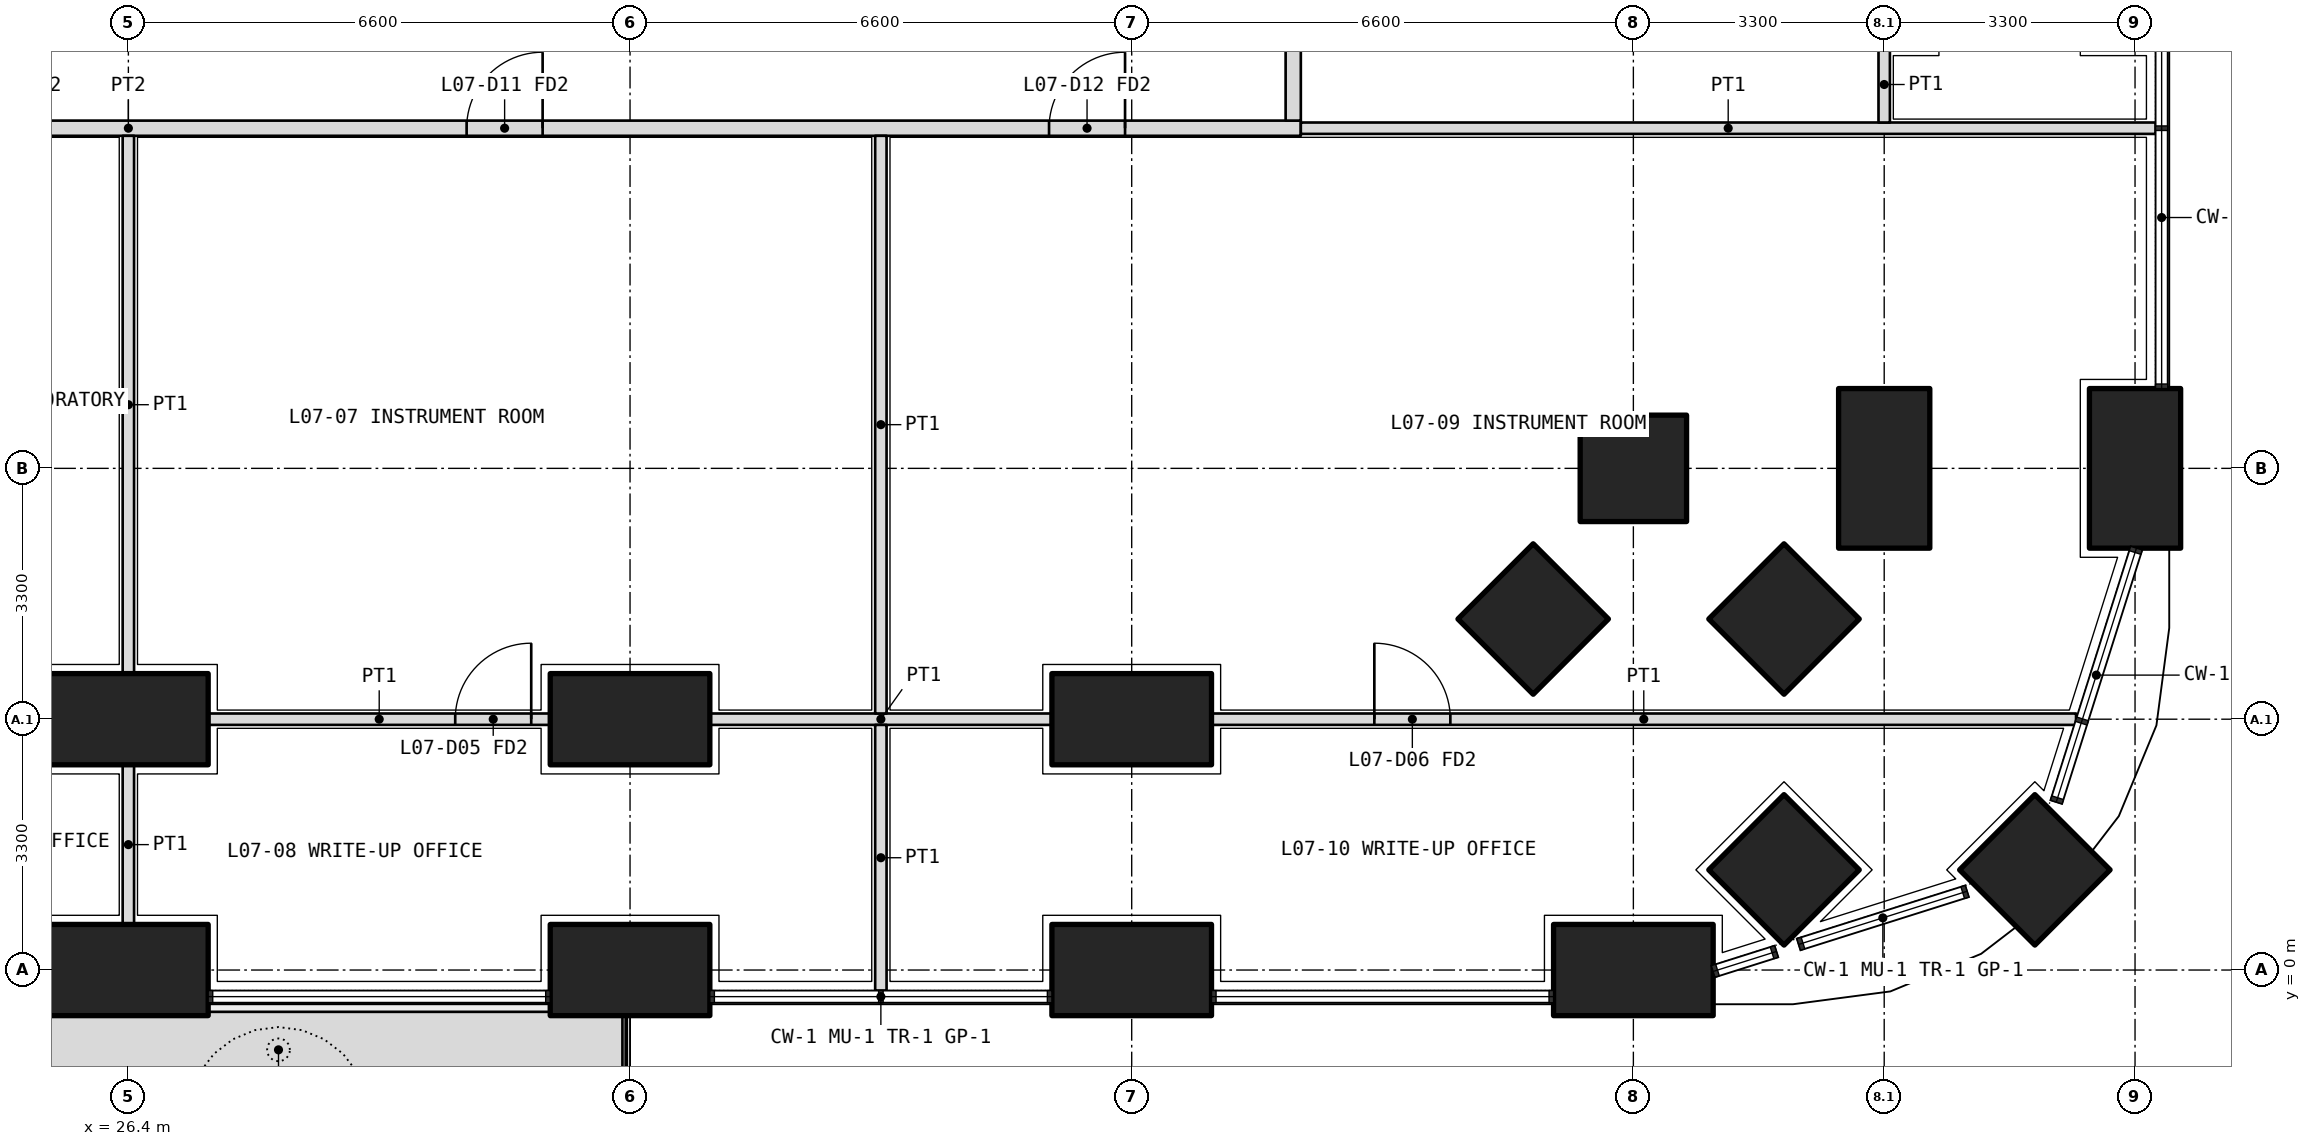
"""IFC4 building model, lengths in metres.
Left out: names, types, materials, properties, quantities, classifications, styles, units other than length and angle.
Written with IfcOpenShell. Run it as: python <this file> out.ifc"""

import sys

from ifc_helpers import new_model, si_unit, direction, frame, frame_2d, origin, origin_2d, place, context, subcontext, project, spatial, polyline, rectangle, outline, extrude, element, fill, save


model = new_model("IFC4")
c1 = context("Model", 3, precision=1e-05, world=origin(), true_north=direction((0.0, 1.0)))
c2 = subcontext(c1, "Body", "Model", "MODEL_VIEW")
j1 = project(units=[si_unit("LENGTHUNIT", "METRE"), si_unit("PLANEANGLEUNIT", "RADIAN")], contexts=[c1])
p1 = place(None, origin())
s1 = spatial("IfcSite", under=j1, at=p1, CompositionType="ELEMENT")
p2 = place(p1, origin())
s2 = spatial("IfcBuilding", under=s1, at=p2, CompositionType="ELEMENT")
p3 = place(p2, frame((0.0, 0.0, 33.9)))
s3 = spatial("IfcBuildingStorey", under=s2, at=p3, CompositionType="ELEMENT", Elevation=33.9)
p4 = place(p3, frame((51.482, 1.318, 0.0), z_axis=(0.0, 0.0, 1.0), x_axis=(0.707106781187, 0.707106781187, 0.0)))
e1 = element("IfcColumn", 1, at=p4, inside=s3, PredefinedType="COLUMN", context=c2, shape_type="SweptSolid", body=[
    extrude(rectangle(XDim=1.4, YDim=1.4, at=origin_2d()), origin(), (0.0, 0.0, 1.0), 4.2),
])
for number, where, z_axis, x_axis in (
    (2, (26.4, 0.0, 0.0), (0.0, 0.0, 1.0), (1.0, 0.0, 0.0)),
    (3, (33.0, 0.0, 0.0), (0.0, 0.0, 1.0), (1.0, 0.0, 0.0)),
    (4, (39.6, 0.0, 0.0), (0.0, 0.0, 1.0), (1.0, 0.0, 0.0)),
    (5, (46.2, 0.0, 0.0), (0.0, 0.0, 1.0), (1.0, 0.0, 0.0)),
    (6, (52.8, 6.6, 0.0), (0.0, 0.0, 1.0), (0.0, 1.0, 0.0)),
):
    element("IfcColumn", number, at=place(p3, frame(where, z_axis=z_axis, x_axis=x_axis)), inside=s3, PredefinedType="COLUMN", context=c2, shape_type="SweptSolid", body=[
        extrude(rectangle(XDim=2.1, YDim=1.2, at=origin_2d()), origin(), (0.0, 0.0, 1.0), 4.2),
    ])
for number, where, z_axis, x_axis in (
    (7, (46.2, 6.6, 0.0), (0.0, 0.0, 1.0), (1.0, 0.0, 0.0)),
    (8, (48.182, 1.318, 0.0), (0.0, 0.0, 1.0), (0.707, 0.707, 0.0)),
):
    element("IfcColumn", number, at=place(p3, frame(where, z_axis=z_axis, x_axis=x_axis)), inside=s3, PredefinedType="COLUMN", context=c2, shape_type="SweptSolid", body=[
        extrude(rectangle(XDim=1.4, YDim=1.4, at=origin_2d()), origin(), (0.0, 0.0, 1.0), 4.2),
    ])
p5 = place(p3, frame((49.5, 6.6, 0.0), z_axis=(0.0, 0.0, 1.0), x_axis=(0.0, 1.0, 0.0)))
e9 = element("IfcColumn", 9, at=p5, inside=s3, PredefinedType="COLUMN", context=c2, shape_type="SweptSolid", body=[
    extrude(rectangle(XDim=2.1, YDim=1.2, at=origin_2d()), origin(), (0.0, 0.0, 1.0), 4.2),
])
p6 = place(p3, frame((48.182, 4.618, 0.0), z_axis=(0.0, 0.0, 1.0), x_axis=(0.707106781187, 0.707106781187, 0.0)))
e10 = element("IfcColumn", 10, at=p6, inside=s3, PredefinedType="COLUMN", context=c2, shape_type="SweptSolid", body=[
    extrude(rectangle(XDim=1.4, YDim=1.4, at=origin_2d()), origin(), (0.0, 0.0, 1.0), 4.2),
])
for number, where, z_axis, x_axis in (
    (11, (26.4, 3.3, 0.0), (0.0, 0.0, 1.0), (1.0, 0.0, 0.0)),
    (12, (33.0, 3.3, 0.0), (0.0, 0.0, 1.0), (1.0, 0.0, 0.0)),
    (13, (39.6, 3.3, 0.0), (0.0, 0.0, 1.0), (1.0, 0.0, 0.0)),
):
    element("IfcColumn", number, at=place(p3, frame(where, z_axis=z_axis, x_axis=x_axis)), inside=s3, PredefinedType="COLUMN", context=c2, shape_type="SweptSolid", body=[
        extrude(rectangle(XDim=2.1, YDim=1.2, at=origin_2d()), origin(), (0.0, 0.0, 1.0), 4.2),
    ])
p7 = place(p3, frame((44.882, 4.618, 0.0), z_axis=(0.0, 0.0, 1.0), x_axis=(0.707106781187, 0.707106781187, 0.0)))
e14 = element("IfcColumn", 14, at=p7, inside=s3, PredefinedType="COLUMN", context=c2, shape_type="SweptSolid", body=[
    extrude(rectangle(XDim=1.4, YDim=1.4, at=origin_2d()), origin(), (0.0, 0.0, 1.0), 4.2),
])
p8 = place(p3, origin())
e15 = element("IfcWall", 15, at=p8, inside=s3, PredefinedType="USERDEFINED", context=c2, shape_type="SweptSolid", body=[
    extrude(outline(polyline([(23.85, -1.55), (32.9, -1.55), (32.9, -0.55), (23.85, -0.55), (23.85, -1.55)]), holes=[polyline([(24.0, -1.4), (32.75, -1.4), (32.75, -0.7), (24.0, -0.7), (24.0, -1.4)])]), origin(), (0.0, 0.0, 1.0), 1.05),
])
p9 = place(p3, frame((10.975, 11.075, 0.0), z_axis=(0.0, 0.0, 1.0), x_axis=(1.0, 0.0, 0.0)))
e16 = element("IfcWall", 16, at=p9, inside=s3, PredefinedType="PARTITIONING", context=c2, shape_type="SweptSolid", body=[
    extrude(rectangle(XDim=30.85, YDim=0.2, at=frame_2d((15.425, 0.0))), origin(), (0.0, 0.0, 1.0), 2.85),
])
p10 = place(p9, frame((2.312, 0.0, 0.0)))
e17 = element("IfcOpeningElement", 17, at=p10, cuts=e16, PredefinedType="OPENING", context=c2, shape_type="SweptSolid", body=[
    extrude(rectangle(XDim=1.0, YDim=2.1, at=frame_2d((0.5, 1.05))), frame((0.0, 0.11, 0.0), z_axis=(0.0, -1.0, 0.0), x_axis=(1.0, 0.0, 0.0)), (0.0, 0.0, 1.0), 0.22),
])
p11 = place(p9, frame((8.325, 0.0, 0.0)))
e18 = element("IfcOpeningElement", 18, at=p11, cuts=e16, PredefinedType="OPENING", context=c2, shape_type="SweptSolid", body=[
    extrude(rectangle(XDim=1.0, YDim=2.1, at=frame_2d((0.5, 1.05))), frame((0.0, 0.11, 0.0), z_axis=(0.0, -1.0, 0.0), x_axis=(1.0, 0.0, 0.0)), (0.0, 0.0, 1.0), 0.22),
])
p12 = place(p9, frame((13.175, 0.0, 0.0)))
e19 = element("IfcOpeningElement", 19, at=p12, cuts=e16, PredefinedType="OPENING", context=c2, shape_type="SweptSolid", body=[
    extrude(rectangle(XDim=1.2, YDim=2.1, at=frame_2d((0.6, 1.05))), frame((0.0, 0.11, 0.0), z_axis=(0.0, -1.0, 0.0), x_axis=(1.0, 0.0, 0.0)), (0.0, 0.0, 1.0), 0.22),
])
p13 = place(p9, frame((19.875, 0.0, 0.0)))
e20 = element("IfcOpeningElement", 20, at=p13, cuts=e16, PredefinedType="OPENING", context=c2, shape_type="SweptSolid", body=[
    extrude(rectangle(XDim=1.0, YDim=2.1, at=frame_2d((0.5, 1.05))), frame((0.0, 0.11, 0.0), z_axis=(0.0, -1.0, 0.0), x_axis=(1.0, 0.0, 0.0)), (0.0, 0.0, 1.0), 0.22),
])
p14 = place(p9, frame((27.538, 0.0, 0.0)))
e21 = element("IfcOpeningElement", 21, at=p14, cuts=e16, PredefinedType="OPENING", context=c2, shape_type="SweptSolid", body=[
    extrude(rectangle(XDim=1.0, YDim=2.1, at=frame_2d((0.5, 1.05))), frame((0.0, 0.11, 0.0), z_axis=(0.0, -1.0, 0.0), x_axis=(1.0, 0.0, 0.0)), (0.0, 0.0, 1.0), 0.22),
])
p15 = place(p3, frame((41.725, 11.175, 0.0), z_axis=(0.0, 0.0, 1.0), x_axis=(0.0, 1.0, 0.0)))
e22 = element("IfcWall", 22, at=p15, inside=s3, PredefinedType="PARTITIONING", context=c2, shape_type="SweptSolid", body=[
    extrude(rectangle(XDim=23.85, YDim=0.2, at=frame_2d((11.925, 0.0))), origin(), (0.0, 0.0, 1.0), 2.85),
])
p16 = place(p15, frame((2.113, 0.0, 0.0)))
e23 = element("IfcOpeningElement", 23, at=p16, cuts=e22, PredefinedType="OPENING", context=c2, shape_type="SweptSolid", body=[
    extrude(rectangle(XDim=1.0, YDim=2.1, at=frame_2d((0.5, 1.05))), frame((0.0, 0.11, 0.0), z_axis=(0.0, -1.0, 0.0), x_axis=(1.0, 0.0, 0.0)), (0.0, 0.0, 1.0), 0.22),
])
p17 = place(p15, frame((6.475, 0.0, 0.0)))
e24 = element("IfcOpeningElement", 24, at=p17, cuts=e22, PredefinedType="OPENING", context=c2, shape_type="SweptSolid", body=[
    extrude(rectangle(XDim=1.0, YDim=2.1, at=frame_2d((0.5, 1.05))), frame((0.0, 0.11, 0.0), z_axis=(0.0, -1.0, 0.0), x_axis=(1.0, 0.0, 0.0)), (0.0, 0.0, 1.0), 0.22),
])
p18 = place(p15, frame((9.725, 0.0, 0.0)))
e25 = element("IfcOpeningElement", 25, at=p18, cuts=e22, PredefinedType="OPENING", context=c2, shape_type="SweptSolid", body=[
    extrude(rectangle(XDim=1.0, YDim=2.1, at=frame_2d((0.5, 1.05))), frame((0.0, 0.11, 0.0), z_axis=(0.0, -1.0, 0.0), x_axis=(1.0, 0.0, 0.0)), (0.0, 0.0, 1.0), 0.22),
])
p19 = place(p15, frame((13.075, 0.0, 0.0)))
e26 = element("IfcOpeningElement", 26, at=p19, cuts=e22, PredefinedType="OPENING", context=c2, shape_type="SweptSolid", body=[
    extrude(rectangle(XDim=0.9, YDim=2.1, at=frame_2d((0.45, 1.05))), frame((0.0, 0.11, 0.0), z_axis=(0.0, -1.0, 0.0), x_axis=(1.0, 0.0, 0.0)), (0.0, 0.0, 1.0), 0.22),
])
p20 = place(p15, frame((19.087, 0.0, 0.0)))
e27 = element("IfcOpeningElement", 27, at=p20, cuts=e22, PredefinedType="OPENING", context=c2, shape_type="SweptSolid", body=[
    extrude(rectangle(XDim=1.0, YDim=2.1, at=frame_2d((0.5, 1.05))), frame((0.0, 0.11, 0.0), z_axis=(0.0, -1.0, 0.0), x_axis=(1.0, 0.0, 0.0)), (0.0, 0.0, 1.0), 0.22),
])
p21 = place(p3, frame((53.07, 11.075, 0.0), z_axis=(0.0, 0.0, 1.0), x_axis=(-1.0, 0.0, 0.0)))
e28 = element("IfcWall", 28, at=p21, inside=s3, PredefinedType="PARTITIONING", context=c2, shape_type="SweptSolid", body=[
    extrude(rectangle(XDim=11.245, YDim=0.15, at=frame_2d((5.623, 0.0))), origin(), (0.0, 0.0, 1.0), 2.7),
])
p22 = place(p3, frame((27.45, 3.3, 0.0), z_axis=(0.0, 0.0, 1.0), x_axis=(1.0, 0.0, 0.0)))
e29 = element("IfcWall", 29, at=p22, inside=s3, PredefinedType="PARTITIONING", context=c2, shape_type="SweptSolid", body=[
    extrude(rectangle(XDim=4.5, YDim=0.15, at=frame_2d((2.25, 0.0))), origin(), (0.0, 0.0, 1.0), 3.9),
])
p23 = place(p22, frame((3.25, 0.0, 0.0)))
e30 = element("IfcOpeningElement", 30, at=p23, cuts=e29, PredefinedType="OPENING", context=c2, shape_type="SweptSolid", body=[
    extrude(rectangle(XDim=1.0, YDim=2.1, at=frame_2d((0.5, 1.05))), frame((0.0, 0.085, 0.0), z_axis=(0.0, -1.0, 0.0), x_axis=(1.0, 0.0, 0.0)), (0.0, 0.0, 1.0), 0.17),
])
p24 = place(p3, frame((34.05, 3.3, 0.0), z_axis=(0.0, 0.0, 1.0), x_axis=(1.0, 0.0, 0.0)))
e31 = element("IfcWall", 31, at=p24, inside=s3, PredefinedType="PARTITIONING", context=c2, shape_type="SweptSolid", body=[
    extrude(rectangle(XDim=4.5, YDim=0.15, at=frame_2d((2.25, 0.0))), origin(), (0.0, 0.0, 1.0), 3.9),
])
p25 = place(p3, frame((40.65, 3.3, 0.0), z_axis=(0.0, 0.0, 1.0), x_axis=(1.0, 0.0, 0.0)))
e32 = element("IfcWall", 32, at=p25, inside=s3, PredefinedType="PARTITIONING", context=c2, shape_type="SweptSolid", body=[
    extrude(rectangle(XDim=11.374, YDim=0.15, at=frame_2d((5.687, 0.0))), origin(), (0.0, 0.0, 1.0), 2.7),
])
p26 = place(p25, frame((2.142, 0.0, 0.0)))
e33 = element("IfcOpeningElement", 33, at=p26, cuts=e32, PredefinedType="OPENING", context=c2, shape_type="SweptSolid", body=[
    extrude(rectangle(XDim=1.0, YDim=2.1, at=frame_2d((0.5, 1.05))), frame((0.0, 0.085, 0.0), z_axis=(0.0, -1.0, 0.0), x_axis=(1.0, 0.0, 0.0)), (0.0, 0.0, 1.0), 0.17),
])
p27 = place(p3, frame((26.4, 0.6, 0.0), z_axis=(0.0, 0.0, 1.0), x_axis=(0.0, 1.0, 0.0)))
e34 = element("IfcWall", 34, at=p27, inside=s3, PredefinedType="PARTITIONING", context=c2, shape_type="SweptSolid", body=[
    extrude(rectangle(XDim=2.1, YDim=0.15, at=frame_2d((1.05, 0.0))), origin(), (0.0, 0.0, 1.0), 2.85),
])
p28 = place(p3, frame((26.4, 3.9, 0.0), z_axis=(0.0, 0.0, 1.0), x_axis=(0.0, 1.0, 0.0)))
e35 = element("IfcWall", 35, at=p28, inside=s3, PredefinedType="PARTITIONING", context=c2, shape_type="SweptSolid", body=[
    extrude(rectangle(XDim=7.075, YDim=0.15, at=frame_2d((3.538, 0.0))), origin(), (0.0, 0.0, 1.0), 2.85),
])
p29 = place(p3, frame((36.3, -0.27, 0.0), z_axis=(0.0, 0.0, 1.0), x_axis=(0.0, 1.0, 0.0)))
e36 = element("IfcWall", 36, at=p29, inside=s3, PredefinedType="PARTITIONING", context=c2, shape_type="SweptSolid", body=[
    extrude(rectangle(XDim=3.495, YDim=0.15, at=frame_2d((1.748, 0.0))), origin(), (0.0, 0.0, 1.0), 2.7),
])
p30 = place(p3, frame((36.3, 3.375, 0.0), z_axis=(0.0, 0.0, 1.0), x_axis=(0.0, 1.0, 0.0)))
e37 = element("IfcWall", 37, at=p30, inside=s3, PredefinedType="PARTITIONING", context=c2, shape_type="SweptSolid", body=[
    extrude(rectangle(XDim=7.6, YDim=0.15, at=frame_2d((3.8, 0.0))), origin(), (0.0, 0.0, 1.0), 3.9),
])
p31 = place(p3, frame((49.5, 11.15, 0.0), z_axis=(0.0, 0.0, 1.0), x_axis=(0.0, 1.0, 0.0)))
e38 = element("IfcWall", 38, at=p31, inside=s3, PredefinedType="PARTITIONING", context=c2, shape_type="SweptSolid", body=[
    extrude(rectangle(XDim=1.0, YDim=0.15, at=frame_2d((0.5, 0.0))), origin(), (0.0, 0.0, 1.0), 3.9),
])
p32 = place(p13, origin())
e39 = element("IfcDoor", 39, at=p32, inside=s3, OperationType="SINGLE_SWING_RIGHT", PredefinedType="DOOR", context=c2, shape_type="SweptSolid", body=[
    extrude(rectangle(XDim=1.0, YDim=2.1, at=frame_2d((0.5, 1.05))), frame((0.0, 0.025, 0.0), z_axis=(0.0, -1.0, 0.0), x_axis=(1.0, 0.0, 0.0)), (0.0, 0.0, 1.0), 0.05),
])
fill(e20, e39)
p33 = place(p23, origin())
e40 = element("IfcDoor", 40, at=p33, inside=s3, OperationType="SINGLE_SWING_RIGHT", PredefinedType="DOOR", context=c2, shape_type="SweptSolid", body=[
    extrude(rectangle(XDim=1.0, YDim=2.1, at=frame_2d((0.5, 1.05))), frame((0.0, 0.025, 0.0), z_axis=(0.0, -1.0, 0.0), x_axis=(1.0, 0.0, 0.0)), (0.0, 0.0, 1.0), 0.05),
])
fill(e30, e40)
p34 = place(p14, origin())
e41 = element("IfcDoor", 41, at=p34, inside=s3, OperationType="SINGLE_SWING_RIGHT", PredefinedType="DOOR", context=c2, shape_type="SweptSolid", body=[
    extrude(rectangle(XDim=1.0, YDim=2.1, at=frame_2d((0.5, 1.05))), frame((0.0, 0.025, 0.0), z_axis=(0.0, -1.0, 0.0), x_axis=(1.0, 0.0, 0.0)), (0.0, 0.0, 1.0), 0.05),
])
fill(e21, e41)
p35 = place(p26, origin())
e42 = element("IfcDoor", 42, at=p35, inside=s3, OperationType="SINGLE_SWING_LEFT", PredefinedType="DOOR", context=c2, shape_type="SweptSolid", body=[
    extrude(rectangle(XDim=1.0, YDim=2.1, at=frame_2d((0.5, 1.05))), frame((0.0, 0.025, 0.0), z_axis=(0.0, -1.0, 0.0), x_axis=(1.0, 0.0, 0.0)), (0.0, 0.0, 1.0), 0.05),
])
fill(e33, e42)
save(model, sys.argv[1])
